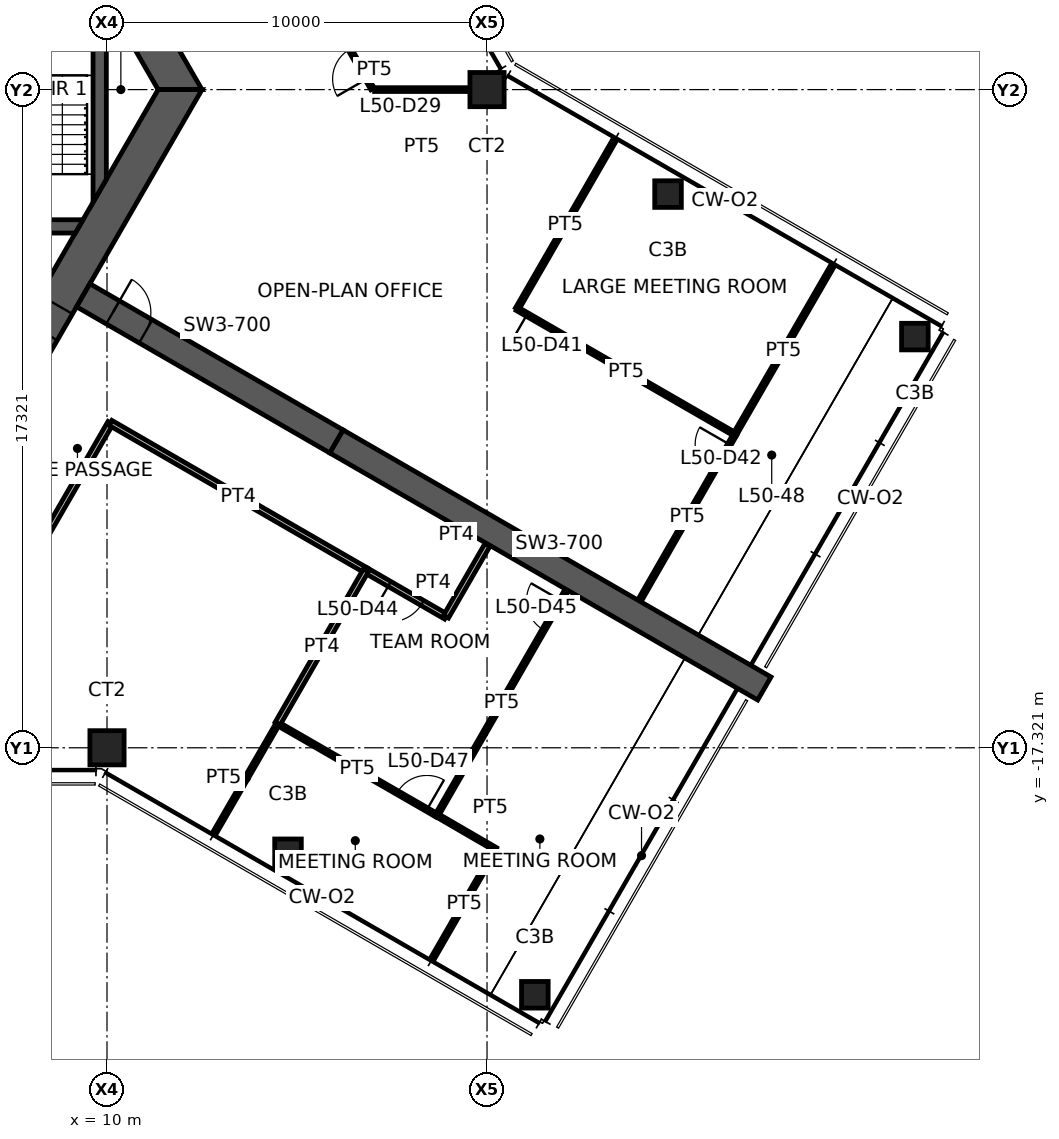
"""IFC4 building model, lengths in metres.
Left out: names, types, materials, properties, quantities, classifications, styles, units other than length and angle.
Written with IfcOpenShell. Run it as: python <this file> out.ifc"""

import sys

from ifc_helpers import new_model, si_unit, direction, frame, frame_2d, origin, origin_2d, place, context, subcontext, project, spatial, polyline, rectangle, hollow_rectangle, outline, extrude, element, fill, save


model = new_model("IFC4")
c1 = context("Model", 3, precision=1e-05, world=origin(), true_north=direction((0.0, 1.0)))
c2 = subcontext(c1, "Body", "Model", "MODEL_VIEW")
j1 = project(units=[si_unit("LENGTHUNIT", "METRE"), si_unit("PLANEANGLEUNIT", "RADIAN")], contexts=[c1])
p1 = place(None, origin())
s1 = spatial("IfcSite", under=j1, at=p1, CompositionType="ELEMENT")
p2 = place(p1, origin())
s2 = spatial("IfcBuilding", under=s1, at=p2, CompositionType="ELEMENT")
p3 = place(p2, frame((0.0, 0.0, 199.4)))
s3 = spatial("IfcBuildingStorey", under=s2, at=p3, CompositionType="ELEMENT", Elevation=199.4)
for number, where, z_axis, x_axis in (
    (1, (20.0, 0.0, 0.0), (0.0, 0.0, 1.0), (1.0, 0.0, 0.0)),
    (2, (10.0, -17.321, 0.0), (0.0, 0.0, 1.0), (1.0, 0.0, 0.0)),
):
    element("IfcColumn", number, at=place(p3, frame(where, z_axis=z_axis, x_axis=x_axis)), inside=s3, PredefinedType="COLUMN", context=c2, shape_type="SweptSolid", body=[
        extrude(hollow_rectangle(XDim=0.9, YDim=0.9, WallThickness=0.09, at=origin_2d()), origin(), (0.0, 0.0, 1.0), 3.9),
    ])
for number, where, z_axis, x_axis in (
    (3, (14.763, -20.071, 0.0), (0.0, 0.0, 1.0), (1.0, 0.0, 0.0)),
    (4, (21.258, -23.821, 0.0), (0.0, 0.0, 1.0), (1.0, 0.0, 0.0)),
    (5, (24.763, -2.75, 0.0), (0.0, 0.0, 1.0), (1.0, 0.0, 0.0)),
    (6, (31.258, -6.5, 0.0), (0.0, 0.0, 1.0), (1.0, 0.0, 0.0)),
):
    element("IfcColumn", number, at=place(p3, frame(where, z_axis=z_axis, x_axis=x_axis)), inside=s3, PredefinedType="COLUMN", context=c2, shape_type="SweptSolid", body=[
        extrude(hollow_rectangle(XDim=0.7, YDim=0.7, WallThickness=0.036, at=origin_2d()), origin(), (0.0, 0.0, 1.0), 3.9),
    ])
p4 = place(p3, frame((11.922, 0.0, 0.0), z_axis=(0.0, 0.0, 1.0), x_axis=(-0.500004296715, 0.866022923061, 0.0)))
e7 = element("IfcWall", 7, at=p4, inside=s3, PredefinedType="SHEAR", context=c2, shape_type="SweptSolid", body=[
    extrude(outline(polyline([(-0.289, -0.5), (5.835, -0.5), (6.635, -0.5), (12.211, -0.5), (11.634, 0.5), (6.635, 0.5), (5.835, 0.5), (0.289, 0.5), (-0.289, -0.5)])), origin(), (0.0, 0.0, 1.0), 3.9),
])
p5 = place(p4, frame((5.835, 0.0, 0.0)))
e8 = element("IfcOpeningElement", 8, at=p5, cuts=e7, PredefinedType="OPENING", context=c2, shape_type="SweptSolid", body=[
    extrude(rectangle(XDim=0.8, YDim=2.1, at=frame_2d((0.4, 1.05))), frame((0.0, 0.51, 0.0), z_axis=(0.0, -1.0, 0.0), x_axis=(1.0, 0.0, 0.0)), (0.0, 0.0, 1.0), 1.02),
])
p6 = place(p3, frame((5.961, -10.325, 0.0), z_axis=(0.0, 0.0, 1.0), x_axis=(0.500004296715, 0.866022923061, 0.0)))
e9 = element("IfcWall", 9, at=p6, inside=s3, PredefinedType="SHEAR", context=c2, shape_type="SweptSolid", body=[
    extrude(outline(polyline([(-0.289, -0.5), (4.594, -0.5), (5.394, -0.5), (12.211, -0.5), (11.634, 0.5), (5.394, 0.5), (4.594, 0.5), (0.289, 0.5), (-0.289, -0.5)])), origin(), (0.0, 0.0, 1.0), 3.9),
])
p7 = place(p6, frame((4.594, 0.0, 0.0)))
e10 = element("IfcOpeningElement", 10, at=p7, cuts=e9, PredefinedType="OPENING", context=c2, shape_type="SweptSolid", body=[
    extrude(rectangle(XDim=0.8, YDim=2.1, at=frame_2d((0.4, 1.05))), frame((0.0, 0.51, 0.0), z_axis=(0.0, -1.0, 0.0), x_axis=(1.0, 0.0, 0.0)), (0.0, 0.0, 1.0), 1.02),
])
p8 = place(p3, frame((9.375, -5.413, 0.0), z_axis=(0.0, 0.0, 1.0), x_axis=(0.866032377459, -0.499987921047, 0.0)))
e11 = element("IfcWall", 11, at=p8, inside=s3, PredefinedType="SHEAR", context=c2, shape_type="SweptSolid", body=[
    extrude(rectangle(XDim=7.696, YDim=0.7, at=frame_2d((3.848, 0.0))), origin(), (0.0, 0.0, 1.0), 3.9),
])
p9 = place(p8, frame((0.9, 0.0, 0.0)))
e12 = element("IfcOpeningElement", 12, at=p9, cuts=e11, PredefinedType="OPENING", context=c2, shape_type="SweptSolid", body=[
    extrude(rectangle(XDim=1.0, YDim=2.1, at=frame_2d((0.5, 1.05))), frame((0.0, 0.36, 0.0), z_axis=(0.0, -1.0, 0.0), x_axis=(1.0, 0.0, 0.0)), (0.0, 0.0, 1.0), 0.72),
])
p10 = place(p3, frame((16.039, -9.26, 0.0), z_axis=(0.0, 0.0, 1.0), x_axis=(0.866024837091, -0.50000098154, 0.0)))
e13 = element("IfcWall", 13, at=p10, inside=s3, PredefinedType="SHEAR", context=c2, shape_type="SweptSolid", body=[
    extrude(rectangle(XDim=13.0, YDim=0.7, at=frame_2d((6.5, 0.0))), origin(), (0.0, 0.0, 1.0), 3.9),
])
p11 = place(p3, frame((1.425, -3.6, 0.0), z_axis=(0.0, 0.0, 1.0), x_axis=(1.0, 0.0, 0.0)))
e14 = element("IfcWall", 14, at=p11, inside=s3, PredefinedType="SHEAR", context=c2, shape_type="SweptSolid", body=[
    extrude(outline(polyline([(0.0, -0.175), (1.075, -0.175), (2.175, -0.175), (7.74, -0.175), (7.942, 0.175), (2.175, 0.175), (1.075, 0.175), (0.0, 0.175), (0.0, -0.175)])), origin(), (0.0, 0.0, 1.0), 3.9),
])
p12 = place(p11, frame((1.075, 0.0, 0.0)))
e15 = element("IfcOpeningElement", 15, at=p12, cuts=e14, PredefinedType="OPENING", context=c2, shape_type="SweptSolid", body=[
    extrude(rectangle(XDim=1.1, YDim=2.1, at=frame_2d((0.55, 1.05))), frame((0.0, 0.185, 0.0), z_axis=(0.0, -1.0, 0.0), x_axis=(1.0, 0.0, 0.0)), (0.0, 0.0, 1.0), 0.37),
])
p13 = place(p3, frame((9.808, -2.662, 0.0), z_axis=(0.0, 0.0, 1.0), x_axis=(0.0, 1.0, 0.0)))
e16 = element("IfcWall", 16, at=p13, inside=s3, PredefinedType="SHEAR", context=c2, shape_type="SweptSolid", body=[
    extrude(outline(polyline([(0.303, -0.175), (5.021, -0.175), (5.628, 0.175), (-0.303, 0.175), (0.303, -0.175)])), origin(), (0.0, 0.0, 1.0), 3.9),
])
p14 = place(p3, frame((16.986, 0.02, 0.0), z_axis=(0.0, 0.0, 1.0), x_axis=(-0.498033790128, 0.86715762344, 0.0)))
e17 = element("IfcWall", 17, at=p14, inside=s3, PredefinedType="PARTITIONING", context=c2, shape_type="SweptSolid", body=[
    extrude(rectangle(XDim=2.025, YDim=0.1, at=frame_2d((1.012, 0.0))), origin(), (0.0, 0.0, 1.0), 2.35),
])
p15 = place(p14, frame((0.3, 0.0, 0.0)))
e18 = element("IfcOpeningElement", 18, at=p15, cuts=e17, PredefinedType="OPENING", context=c2, shape_type="SweptSolid", body=[
    extrude(rectangle(XDim=0.9, YDim=2.1, at=frame_2d((0.45, 1.05))), frame((0.0, 0.06, 0.0), z_axis=(0.0, -1.0, 0.0), x_axis=(1.0, 0.0, 0.0)), (0.0, 0.0, 1.0), 0.12),
])
p16 = place(p3, frame((29.077, -4.658, 0.0), z_axis=(0.0, 0.0, 1.0), x_axis=(-0.500900533712, -0.86550485575, 0.0)))
e19 = element("IfcWall", 19, at=p16, inside=s3, PredefinedType="PARTITIONING", context=c2, shape_type="SweptSolid", body=[
    extrude(rectangle(XDim=5.105, YDim=0.1, at=frame_2d((2.552, 0.0))), origin(), (0.0, 0.0, 1.0), 2.35),
])
p17 = place(p3, frame((20.792, -5.769, 0.0), z_axis=(0.0, 0.0, 1.0), x_axis=(0.500005339912, 0.866022320763, 0.0)))
e20 = element("IfcWall", 20, at=p17, inside=s3, PredefinedType="PARTITIONING", context=c2, shape_type="SweptSolid", body=[
    extrude(rectangle(XDim=5.08, YDim=0.1, at=frame_2d((2.54, 0.0))), origin(), (0.0, 0.0, 1.0), 2.35),
])
p18 = place(p3, frame((26.527, -9.075, 0.0), z_axis=(0.0, 0.0, 1.0), x_axis=(-0.866343956507, 0.499447844147, 0.0)))
e21 = element("IfcWall", 21, at=p18, inside=s3, PredefinedType="PARTITIONING", context=c2, shape_type="SweptSolid", body=[
    extrude(rectangle(XDim=6.62, YDim=0.1, at=frame_2d((3.31, 0.0))), origin(), (0.0, 0.0, 1.0), 2.35),
])
p19 = place(p18, frame((5.42, 0.0, 0.0)))
e22 = element("IfcOpeningElement", 22, at=p19, cuts=e21, PredefinedType="OPENING", context=c2, shape_type="SweptSolid", body=[
    extrude(rectangle(XDim=0.9, YDim=2.1, at=frame_2d((0.45, 1.05))), frame((0.0, 0.06, 0.0), z_axis=(0.0, -1.0, 0.0), x_axis=(1.0, 0.0, 0.0)), (0.0, 0.0, 1.0), 0.12),
])
p20 = place(p3, frame((24.018, -13.439, 0.0), z_axis=(0.0, 0.0, 1.0), x_axis=(0.498430118894, 0.866929879851, 0.0)))
e23 = element("IfcWall", 23, at=p20, inside=s3, PredefinedType="PARTITIONING", context=c2, shape_type="SweptSolid", body=[
    extrude(rectangle(XDim=5.034, YDim=0.1, at=frame_2d((2.517, 0.0))), origin(), (0.0, 0.0, 1.0), 2.35),
])
p21 = place(p20, frame((3.834, 0.0, 0.0)))
e24 = element("IfcOpeningElement", 24, at=p21, cuts=e23, PredefinedType="OPENING", context=c2, shape_type="SweptSolid", body=[
    extrude(rectangle(XDim=0.9, YDim=2.1, at=frame_2d((0.45, 1.05))), frame((0.0, 0.06, 0.0), z_axis=(0.0, -1.0, 0.0), x_axis=(1.0, 0.0, 0.0)), (0.0, 0.0, 1.0), 0.12),
])
p22 = place(p3, frame((10.092, -8.771, 0.0), z_axis=(0.0, 0.0, 1.0), x_axis=(-0.500019495363, -0.866014147839, 0.0)))
e25 = element("IfcWall", 25, at=p22, inside=s3, PredefinedType="PARTITIONING", context=c2, shape_type="SweptSolid", body=[
    extrude(rectangle(XDim=5.028, YDim=0.15, at=frame_2d((2.514, 0.0))), origin(), (0.0, 0.0, 1.0), 2.35),
])
p23 = place(p3, frame((16.822, -12.656, 0.0), z_axis=(0.0, 0.0, 1.0), x_axis=(-0.866028634939, 0.499994403434, 0.0)))
e26 = element("IfcWall", 26, at=p23, inside=s3, PredefinedType="PARTITIONING", context=c2, shape_type="SweptSolid", body=[
    extrude(rectangle(XDim=7.771, YDim=0.15, at=frame_2d((3.885, 0.0))), origin(), (0.0, 0.0, 1.0), 2.35),
])
p24 = place(p3, frame((18.921, -13.869, 0.0), z_axis=(0.0, 0.0, 1.0), x_axis=(-0.866000196749, 0.500043657324, 0.0)))
e27 = element("IfcWall", 27, at=p24, inside=s3, PredefinedType="PARTITIONING", context=c2, shape_type="SweptSolid", body=[
    extrude(rectangle(XDim=2.434, YDim=0.15, at=frame_2d((1.217, 0.0))), origin(), (0.0, 0.0, 1.0), 2.35),
])
p25 = place(p24, frame((0.717, 0.0, 0.0)))
e28 = element("IfcOpeningElement", 28, at=p25, cuts=e27, PredefinedType="OPENING", context=c2, shape_type="SweptSolid", body=[
    extrude(rectangle(XDim=1.0, YDim=2.1, at=frame_2d((0.5, 1.05))), frame((0.0, 0.085, 0.0), z_axis=(0.0, -1.0, 0.0), x_axis=(1.0, 0.0, 0.0)), (0.0, 0.0, 1.0), 0.17),
])
p26 = place(p3, frame((20.011, -11.981, 0.0), z_axis=(0.0, 0.0, 1.0), x_axis=(-0.500029427677, -0.866008413041, 0.0)))
e29 = element("IfcWall", 29, at=p26, inside=s3, PredefinedType="PARTITIONING", context=c2, shape_type="SweptSolid", body=[
    extrude(rectangle(XDim=2.18, YDim=0.15, at=frame_2d((1.09, 0.0))), origin(), (0.0, 0.0, 1.0), 2.35),
])
p27 = place(p3, frame((18.573, -22.853, 0.0), z_axis=(0.0, 0.0, 1.0), x_axis=(0.499920671713, 0.866071199148, 0.0)))
e30 = element("IfcWall", 30, at=p27, inside=s3, PredefinedType="PARTITIONING", context=c2, shape_type="SweptSolid", body=[
    extrude(rectangle(XDim=3.305, YDim=0.1, at=frame_2d((1.653, 0.0))), origin(), (0.0, 0.0, 1.0), 2.35),
])
p28 = place(p3, frame((20.225, -19.991, 0.0), z_axis=(0.0, 0.0, 1.0), x_axis=(-0.864647633554, 0.502378811047, 0.0)))
e31 = element("IfcWall", 31, at=p28, inside=s3, PredefinedType="PARTITIONING", context=c2, shape_type="SweptSolid", body=[
    extrude(rectangle(XDim=1.791, YDim=0.1, at=frame_2d((0.896, 0.0))), origin(), (0.0, 0.0, 1.0), 2.35),
])
p29 = place(p3, frame((18.678, -19.097, 0.0), z_axis=(0.0, 0.0, 1.0), x_axis=(0.499488276661, 0.86632064588, 0.0)))
e32 = element("IfcWall", 32, at=p29, inside=s3, PredefinedType="PARTITIONING", context=c2, shape_type="SweptSolid", body=[
    extrude(rectangle(XDim=6.83, YDim=0.1, at=frame_2d((3.415, 0.0))), origin(), (0.0, 0.0, 1.0), 2.35),
])
p30 = place(p29, frame((5.63, 0.0, 0.0)))
e33 = element("IfcOpeningElement", 33, at=p30, cuts=e32, PredefinedType="OPENING", context=c2, shape_type="SweptSolid", body=[
    extrude(rectangle(XDim=0.9, YDim=2.1, at=frame_2d((0.45, 1.05))), frame((0.0, 0.06, 0.0), z_axis=(0.0, -1.0, 0.0), x_axis=(1.0, 0.0, 0.0)), (0.0, 0.0, 1.0), 0.12),
])
p31 = place(p3, frame((12.84, -19.543, 0.0), z_axis=(0.0, 0.0, 1.0), x_axis=(0.501269197563, 0.865291391136, 0.0)))
e34 = element("IfcWall", 34, at=p31, inside=s3, PredefinedType="PARTITIONING", context=c2, shape_type="SweptSolid", body=[
    extrude(rectangle(XDim=3.305, YDim=0.1, at=frame_2d((1.653, 0.0))), origin(), (0.0, 0.0, 1.0), 2.35),
])
p32 = place(p3, frame((14.49, -16.685, 0.0), z_axis=(0.0, 0.0, 1.0), x_axis=(0.866481441777, -0.499209285827, 0.0)))
e35 = element("IfcWall", 35, at=p32, inside=s3, PredefinedType="PARTITIONING", context=c2, shape_type="SweptSolid", body=[
    extrude(rectangle(XDim=4.833, YDim=0.1, at=frame_2d((2.417, 0.0))), origin(), (0.0, 0.0, 1.0), 2.35),
])
p33 = place(p32, frame((3.633, 0.0, 0.0)))
e36 = element("IfcOpeningElement", 36, at=p33, cuts=e35, PredefinedType="OPENING", context=c2, shape_type="SweptSolid", body=[
    extrude(rectangle(XDim=0.9, YDim=2.1, at=frame_2d((0.45, 1.05))), frame((0.0, 0.06, 0.0), z_axis=(0.0, -1.0, 0.0), x_axis=(1.0, 0.0, 0.0)), (0.0, 0.0, 1.0), 0.12),
])
p34 = place(p3, frame((16.812, -12.652, 0.0), z_axis=(0.0, 0.0, 1.0), x_axis=(-0.499085020987, -0.86655302309, 0.0)))
e37 = element("IfcWall", 37, at=p34, inside=s3, PredefinedType="PARTITIONING", context=c2, shape_type="SweptSolid", body=[
    extrude(rectangle(XDim=4.654, YDim=0.15, at=frame_2d((2.327, 0.0))), origin(), (0.0, 0.0, 1.0), 2.35),
])
p35 = place(p3, frame((19.519, 0.0, 0.0), z_axis=(0.0, 0.0, 1.0), x_axis=(-1.0, 0.0, 0.0)))
e38 = element("IfcWall", 38, at=p35, inside=s3, PredefinedType="PARTITIONING", context=c2, shape_type="SweptSolid", body=[
    extrude(rectangle(XDim=2.478, YDim=0.1, at=frame_2d((1.239, 0.0))), origin(), (0.0, 0.0, 1.0), 2.35),
])
p36 = place(p7, origin())
e39 = element("IfcDoor", 39, at=p36, inside=s3, OperationType="SINGLE_SWING_LEFT", PredefinedType="DOOR", context=c2, shape_type="SweptSolid", body=[
    extrude(rectangle(XDim=0.8, YDim=2.1, at=frame_2d((0.4, 1.05))), frame((0.0, 0.025, 0.0), z_axis=(0.0, -1.0, 0.0), x_axis=(1.0, 0.0, 0.0)), (0.0, 0.0, 1.0), 0.05),
])
fill(e10, e39)
p37 = place(p9, origin())
e40 = element("IfcDoor", 40, at=p37, inside=s3, OperationType="SINGLE_SWING_LEFT", PredefinedType="DOOR", context=c2, shape_type="SweptSolid", body=[
    extrude(rectangle(XDim=1.0, YDim=2.1, at=frame_2d((0.5, 1.05))), frame((0.0, 0.025, 0.0), z_axis=(0.0, -1.0, 0.0), x_axis=(1.0, 0.0, 0.0)), (0.0, 0.0, 1.0), 0.05),
])
fill(e12, e40)
p38 = place(p15, origin())
e41 = element("IfcDoor", 41, at=p38, inside=s3, OperationType="SINGLE_SWING_LEFT", PredefinedType="DOOR", context=c2, shape_type="SweptSolid", body=[
    extrude(rectangle(XDim=0.9, YDim=2.1, at=frame_2d((0.45, 1.05))), frame((0.0, 0.025, 0.0), z_axis=(0.0, -1.0, 0.0), x_axis=(1.0, 0.0, 0.0)), (0.0, 0.0, 1.0), 0.05),
])
fill(e18, e41)
p39 = place(p19, origin())
e42 = element("IfcDoor", 42, at=p39, inside=s3, OperationType="SINGLE_SWING_RIGHT", PredefinedType="DOOR", context=c2, shape_type="SweptSolid", body=[
    extrude(rectangle(XDim=0.9, YDim=2.1, at=frame_2d((0.45, 1.05))), frame((0.0, 0.025, 0.0), z_axis=(0.0, -1.0, 0.0), x_axis=(1.0, 0.0, 0.0)), (0.0, 0.0, 1.0), 0.05),
])
fill(e22, e42)
p40 = place(p21, origin())
e43 = element("IfcDoor", 43, at=p40, inside=s3, OperationType="SINGLE_SWING_RIGHT", PredefinedType="DOOR", context=c2, shape_type="SweptSolid", body=[
    extrude(rectangle(XDim=0.9, YDim=2.1, at=frame_2d((0.45, 1.05))), frame((0.0, 0.025, 0.0), z_axis=(0.0, -1.0, 0.0), x_axis=(1.0, 0.0, 0.0)), (0.0, 0.0, 1.0), 0.05),
])
fill(e24, e43)
p41 = place(p25, origin())
e44 = element("IfcDoor", 44, at=p41, inside=s3, OperationType="SINGLE_SWING_RIGHT", PredefinedType="DOOR", context=c2, shape_type="SweptSolid", body=[
    extrude(rectangle(XDim=1.0, YDim=2.1, at=frame_2d((0.5, 1.05))), frame((0.0, 0.025, 0.0), z_axis=(0.0, -1.0, 0.0), x_axis=(1.0, 0.0, 0.0)), (0.0, 0.0, 1.0), 0.05),
])
fill(e28, e44)
p42 = place(p30, origin())
e45 = element("IfcDoor", 45, at=p42, inside=s3, OperationType="SINGLE_SWING_RIGHT", PredefinedType="DOOR", context=c2, shape_type="SweptSolid", body=[
    extrude(rectangle(XDim=0.9, YDim=2.1, at=frame_2d((0.45, 1.05))), frame((0.0, 0.025, 0.0), z_axis=(0.0, -1.0, 0.0), x_axis=(1.0, 0.0, 0.0)), (0.0, 0.0, 1.0), 0.05),
])
fill(e33, e45)
p43 = place(p33, origin())
e46 = element("IfcDoor", 46, at=p43, inside=s3, OperationType="SINGLE_SWING_RIGHT", PredefinedType="DOOR", context=c2, shape_type="SweptSolid", body=[
    extrude(rectangle(XDim=0.9, YDim=2.1, at=frame_2d((0.45, 1.05))), frame((0.0, 0.025, 0.0), z_axis=(0.0, -1.0, 0.0), x_axis=(1.0, 0.0, 0.0)), (0.0, 0.0, 1.0), 0.05),
])
fill(e36, e46)
save(model, sys.argv[1])
